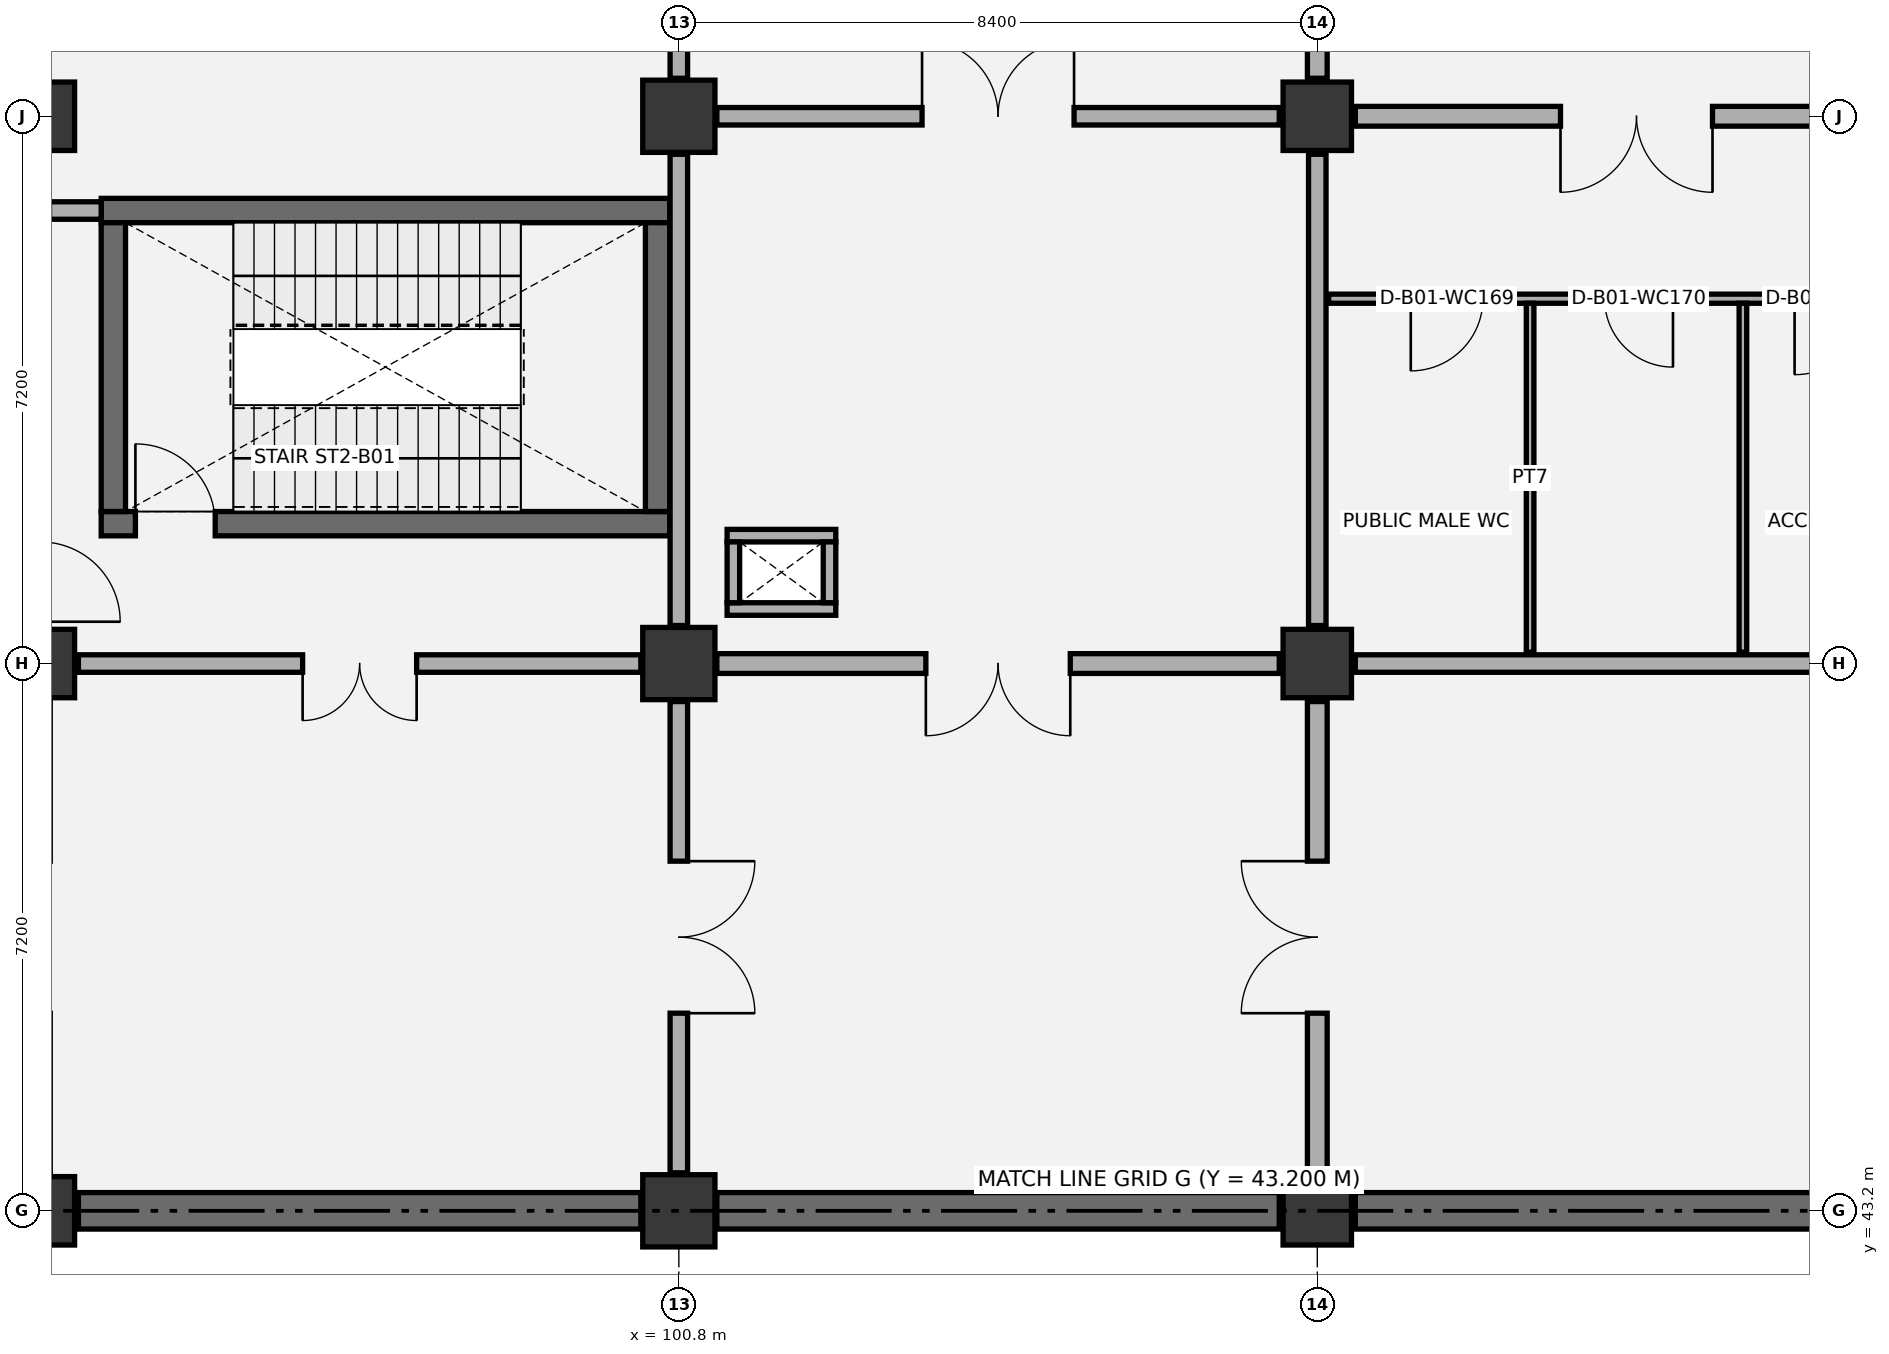
"""IFC4 building model, lengths in metres.
Left out: names, types, materials, properties, quantities, classifications, styles, units other than length and angle.
Written with IfcOpenShell. Run it as: python <this file> out.ifc"""

import sys

from ifc_helpers import new_model, si_unit, direction, frame, frame_2d, origin, origin_2d, place, context, subcontext, project, spatial, rectangle, extrude, element, fill, save


model = new_model("IFC4")
c1 = context("Model", 3, precision=1e-05, world=origin(), true_north=direction((0.0, 1.0)))
c2 = subcontext(c1, "Body", "Model", "MODEL_VIEW")
j1 = project(units=[si_unit("LENGTHUNIT", "METRE"), si_unit("PLANEANGLEUNIT", "RADIAN")], contexts=[c1])
p1 = place(None, origin())
s1 = spatial("IfcSite", under=j1, at=p1, CompositionType="ELEMENT")
p2 = place(p1, origin())
s2 = spatial("IfcBuilding", under=s1, at=p2, CompositionType="ELEMENT")
p3 = place(p2, frame((0.0, 0.0, -4.8)))
s3 = spatial("IfcBuildingStorey", under=s2, at=p3, CompositionType="ELEMENT", Elevation=-4.8)
for number, where, z_axis, x_axis in (
    (1, (92.4, 43.2, 0.0), (0.0, 0.0, 1.0), (1.0, 0.0, 0.0)),
    (2, (92.4, 50.4, 0.0), (0.0, 0.0, 1.0), (1.0, 0.0, 0.0)),
    (3, (92.4, 57.6, 0.0), (0.0, 0.0, 1.0), (1.0, 0.0, 0.0)),
):
    element("IfcColumn", number, at=place(p3, frame(where, z_axis=z_axis, x_axis=x_axis)), inside=s3, PredefinedType="COLUMN", context=c2, shape_type="SweptSolid", body=[
        extrude(rectangle(XDim=0.9, YDim=0.9, at=origin_2d()), origin(), (0.0, 0.0, 1.0), 4.8),
    ])
for number, where, z_axis, x_axis in (
    (4, (100.8, 43.2, 0.0), (0.0, 0.0, 1.0), (1.0, 0.0, 0.0)),
    (5, (100.8, 50.4, 0.0), (0.0, 0.0, 1.0), (1.0, 0.0, 0.0)),
    (6, (100.8, 57.6, 0.0), (0.0, 0.0, 1.0), (1.0, 0.0, 0.0)),
):
    element("IfcColumn", number, at=place(p3, frame(where, z_axis=z_axis, x_axis=x_axis)), inside=s3, PredefinedType="COLUMN", context=c2, shape_type="SweptSolid", body=[
        extrude(rectangle(XDim=0.95, YDim=0.95, at=origin_2d()), origin(), (0.0, 0.0, 1.0), 4.8),
    ])
for number, where, z_axis, x_axis in (
    (7, (109.2, 43.2, 0.0), (0.0, 0.0, 1.0), (1.0, 0.0, 0.0)),
    (8, (109.2, 50.4, 0.0), (0.0, 0.0, 1.0), (1.0, 0.0, 0.0)),
    (9, (109.2, 57.6, 0.0), (0.0, 0.0, 1.0), (1.0, 0.0, 0.0)),
):
    element("IfcColumn", number, at=place(p3, frame(where, z_axis=z_axis, x_axis=x_axis)), inside=s3, PredefinedType="COLUMN", context=c2, shape_type="SweptSolid", body=[
        extrude(rectangle(XDim=0.9, YDim=0.9, at=origin_2d()), origin(), (0.0, 0.0, 1.0), 4.8),
    ])
p4 = place(p3, frame((92.9, 43.2, 0.0), z_axis=(0.0, 0.0, 1.0), x_axis=(1.0, 0.0, 0.0)))
e10 = element("IfcWall", 10, at=p4, inside=s3, PredefinedType="USERDEFINED", context=c2, shape_type="SweptSolid", body=[
    extrude(rectangle(XDim=7.4, YDim=0.48, at=frame_2d((3.7, 0.0))), origin(), (0.0, 0.0, 1.0), 4.45),
])
p5 = place(p3, frame((101.3, 43.2, 0.0), z_axis=(0.0, 0.0, 1.0), x_axis=(1.0, 0.0, 0.0)))
e11 = element("IfcWall", 11, at=p5, inside=s3, PredefinedType="USERDEFINED", context=c2, shape_type="SweptSolid", body=[
    extrude(rectangle(XDim=7.4, YDim=0.48, at=frame_2d((3.7, 0.0))), origin(), (0.0, 0.0, 1.0), 4.45),
])
p6 = place(p3, frame((109.7, 43.2, 0.0), z_axis=(0.0, 0.0, 1.0), x_axis=(1.0, 0.0, 0.0)))
e12 = element("IfcWall", 12, at=p6, inside=s3, PredefinedType="USERDEFINED", context=c2, shape_type="SweptSolid", body=[
    extrude(rectangle(XDim=7.4, YDim=0.48, at=frame_2d((3.7, 0.0))), origin(), (0.0, 0.0, 1.0), 4.45),
])
p7 = place(p3, frame((93.2, 52.24, 0.0), z_axis=(0.0, 0.0, 1.0), x_axis=(1.0, 0.0, 0.0)))
e13 = element("IfcWall", 13, at=p7, inside=s3, PredefinedType="SHEAR", context=c2, shape_type="SweptSolid", body=[
    extrude(rectangle(XDim=7.48, YDim=0.32, at=frame_2d((3.74, 0.0))), origin(), (0.0, 0.0, 1.0), 4.45),
])
p8 = place(p7, frame((0.45, 0.0, 0.0)))
e14 = element("IfcOpeningElement", 14, at=p8, cuts=e13, PredefinedType="OPENING", context=c2, shape_type="SweptSolid", body=[
    extrude(rectangle(XDim=1.05, YDim=2.15, at=frame_2d((0.525, 1.075))), frame((0.0, 0.17, 0.0), z_axis=(0.0, -1.0, 0.0), x_axis=(1.0, 0.0, 0.0)), (0.0, 0.0, 1.0), 0.34),
])
p9 = place(p3, frame((93.2, 56.36, 0.0), z_axis=(0.0, 0.0, 1.0), x_axis=(1.0, 0.0, 0.0)))
e15 = element("IfcWall", 15, at=p9, inside=s3, PredefinedType="SHEAR", context=c2, shape_type="SweptSolid", body=[
    extrude(rectangle(XDim=7.48, YDim=0.32, at=frame_2d((3.74, 0.0))), origin(), (0.0, 0.0, 1.0), 4.45),
])
for number, where, z_axis, x_axis in (
    (16, (93.36, 52.4, 0.0), (0.0, 0.0, 1.0), (0.0, 1.0, 0.0)),
    (17, (100.52, 52.4, 0.0), (0.0, 0.0, 1.0), (0.0, 1.0, 0.0)),
):
    element("IfcWall", number, at=place(p3, frame(where, z_axis=z_axis, x_axis=x_axis)), inside=s3, PredefinedType="SHEAR", context=c2, shape_type="SweptSolid", body=[
        extrude(rectangle(XDim=3.8, YDim=0.32, at=frame_2d((1.9, 0.0))), origin(), (0.0, 0.0, 1.0), 4.45),
    ])
for number, where, z_axis, x_axis in (
    (18, (101.435, 51.117, 0.0), (0.0, 0.0, 1.0), (1.0, 0.0, 0.0)),
    (19, (101.435, 52.083, 0.0), (0.0, 0.0, 1.0), (1.0, 0.0, 0.0)),
):
    element("IfcWall", number, at=place(p3, frame(where, z_axis=z_axis, x_axis=x_axis)), inside=s3, PredefinedType="PARTITIONING", context=c2, shape_type="SweptSolid", body=[
        extrude(rectangle(XDim=1.43, YDim=0.165, at=frame_2d((0.715, 0.0))), origin(), (0.0, 0.0, 1.0), 4.45),
    ])
for number, where, z_axis, x_axis in (
    (20, (101.518, 51.2, 0.0), (0.0, 0.0, 1.0), (0.0, 1.0, 0.0)),
    (21, (102.782, 51.2, 0.0), (0.0, 0.0, 1.0), (0.0, 1.0, 0.0)),
):
    element("IfcWall", number, at=place(p3, frame(where, z_axis=z_axis, x_axis=x_axis)), inside=s3, PredefinedType="PARTITIONING", context=c2, shape_type="SweptSolid", body=[
        extrude(rectangle(XDim=0.8, YDim=0.165, at=frame_2d((0.4, 0.0))), origin(), (0.0, 0.0, 1.0), 4.45),
    ])
p10 = place(p3, frame((109.35, 55.2, 0.0), z_axis=(0.0, 0.0, 1.0), x_axis=(1.0, 0.0, 0.0)))
e22 = element("IfcWall", 22, at=p10, inside=s3, PredefinedType="PARTITIONING", context=c2, shape_type="SweptSolid", body=[
    extrude(rectangle(XDim=8.1, YDim=0.12, at=frame_2d((4.05, 0.0))), origin(), (0.0, 0.0, 1.0), 4.45),
])
p11 = place(p10, frame((1.08, 0.0, 0.0)))
e23 = element("IfcOpeningElement", 23, at=p11, cuts=e22, PredefinedType="OPENING", context=c2, shape_type="SweptSolid", body=[
    extrude(rectangle(XDim=0.95, YDim=2.1, at=frame_2d((0.475, 1.05))), frame((0.0, 0.07, 0.0), z_axis=(0.0, -1.0, 0.0), x_axis=(1.0, 0.0, 0.0)), (0.0, 0.0, 1.0), 0.14),
])
p12 = place(p10, frame((3.63, 0.0, 0.0)))
e24 = element("IfcOpeningElement", 24, at=p12, cuts=e22, PredefinedType="OPENING", context=c2, shape_type="SweptSolid", body=[
    extrude(rectangle(XDim=0.9, YDim=2.1, at=frame_2d((0.45, 1.05))), frame((0.0, 0.07, 0.0), z_axis=(0.0, -1.0, 0.0), x_axis=(1.0, 0.0, 0.0)), (0.0, 0.0, 1.0), 0.14),
])
p13 = place(p10, frame((6.13, 0.0, 0.0)))
e25 = element("IfcOpeningElement", 25, at=p13, cuts=e22, PredefinedType="OPENING", context=c2, shape_type="SweptSolid", body=[
    extrude(rectangle(XDim=1.0, YDim=2.1, at=frame_2d((0.5, 1.05))), frame((0.0, 0.07, 0.0), z_axis=(0.0, -1.0, 0.0), x_axis=(1.0, 0.0, 0.0)), (0.0, 0.0, 1.0), 0.14),
])
for number, where, z_axis, x_axis in (
    (26, (112.0, 50.55, 0.0), (0.0, 0.0, 1.0), (0.0, 1.0, 0.0)),
    (27, (114.8, 50.55, 0.0), (0.0, 0.0, 1.0), (0.0, 1.0, 0.0)),
):
    element("IfcWall", number, at=place(p3, frame(where, z_axis=z_axis, x_axis=x_axis)), inside=s3, PredefinedType="PARTITIONING", context=c2, shape_type="SweptSolid", body=[
        extrude(rectangle(XDim=4.59, YDim=0.1, at=frame_2d((2.295, 0.0))), origin(), (0.0, 0.0, 1.0), 4.45),
    ])
p14 = place(p3, frame((100.8, 43.7, 0.0), z_axis=(0.0, 0.0, 1.0), x_axis=(0.0, 1.0, 0.0)))
e28 = element("IfcWall", 28, at=p14, inside=s3, PredefinedType="PARTITIONING", context=c2, shape_type="SweptSolid", body=[
    extrude(rectangle(XDim=6.2, YDim=0.23, at=frame_2d((3.1, 0.0))), origin(), (0.0, 0.0, 1.0), 3.645),
])
p15 = place(p14, frame((2.1, 0.0, 0.0)))
e29 = element("IfcOpeningElement", 29, at=p15, cuts=e28, PredefinedType="OPENING", context=c2, shape_type="SweptSolid", body=[
    extrude(rectangle(XDim=2.0, YDim=2.35, at=frame_2d((1.0, 1.175))), frame((0.0, 0.125, 0.0), z_axis=(0.0, -1.0, 0.0), x_axis=(1.0, 0.0, 0.0)), (0.0, 0.0, 1.0), 0.25),
])
p16 = place(p3, frame((92.9, 50.4, 0.0), z_axis=(0.0, 0.0, 1.0), x_axis=(1.0, 0.0, 0.0)))
e30 = element("IfcWall", 30, at=p16, inside=s3, PredefinedType="PARTITIONING", context=c2, shape_type="SweptSolid", body=[
    extrude(rectangle(XDim=7.4, YDim=0.23, at=frame_2d((3.7, 0.0))), origin(), (0.0, 0.0, 1.0), 3.545),
])
p17 = place(p16, frame((2.95, 0.0, 0.0)))
e31 = element("IfcOpeningElement", 31, at=p17, cuts=e30, PredefinedType="OPENING", context=c2, shape_type="SweptSolid", body=[
    extrude(rectangle(XDim=1.5, YDim=2.15, at=frame_2d((0.75, 1.075))), frame((0.0, 0.125, 0.0), z_axis=(0.0, -1.0, 0.0), x_axis=(1.0, 0.0, 0.0)), (0.0, 0.0, 1.0), 0.25),
])
p18 = place(p3, frame((100.8, 50.9, 0.0), z_axis=(0.0, 0.0, 1.0), x_axis=(0.0, 1.0, 0.0)))
e32 = element("IfcWall", 32, at=p18, inside=s3, PredefinedType="PARTITIONING", context=c2, shape_type="SweptSolid", body=[
    extrude(rectangle(XDim=6.2, YDim=0.23, at=frame_2d((3.1, 0.0))), origin(), (0.0, 0.0, 1.0), 3.645),
])
p19 = place(p3, frame((92.52, 56.36, 0.0), z_axis=(0.0, 0.0, 1.0), x_axis=(1.0, 0.0, 0.0)))
e33 = element("IfcWall", 33, at=p19, inside=s3, PredefinedType="PARTITIONING", context=c2, shape_type="SweptSolid", body=[
    extrude(rectangle(XDim=0.68, YDim=0.23, at=frame_2d((0.34, 0.0))), origin(), (0.0, 0.0, 1.0), 4.45),
])
p20 = place(p3, frame((100.8, 58.1, 0.0), z_axis=(0.0, 0.0, 1.0), x_axis=(0.0, 1.0, 0.0)))
e34 = element("IfcWall", 34, at=p20, inside=s3, PredefinedType="PARTITIONING", context=c2, shape_type="SweptSolid", body=[
    extrude(rectangle(XDim=6.2, YDim=0.23, at=frame_2d((3.1, 0.0))), origin(), (0.0, 0.0, 1.0), 3.645),
])
p21 = place(p3, frame((109.2, 43.7, 0.0), z_axis=(0.0, 0.0, 1.0), x_axis=(0.0, 1.0, 0.0)))
e35 = element("IfcWall", 35, at=p21, inside=s3, PredefinedType="PARTITIONING", context=c2, shape_type="SweptSolid", body=[
    extrude(rectangle(XDim=6.2, YDim=0.26, at=frame_2d((3.1, 0.0))), origin(), (0.0, 0.0, 1.0), 3.645),
])
p22 = place(p21, frame((2.1, 0.0, 0.0)))
e36 = element("IfcOpeningElement", 36, at=p22, cuts=e35, PredefinedType="OPENING", context=c2, shape_type="SweptSolid", body=[
    extrude(rectangle(XDim=2.0, YDim=2.35, at=frame_2d((1.0, 1.175))), frame((0.0, 0.14, 0.0), z_axis=(0.0, -1.0, 0.0), x_axis=(1.0, 0.0, 0.0)), (0.0, 0.0, 1.0), 0.28),
])
p23 = place(p3, frame((101.3, 50.4, 0.0), z_axis=(0.0, 0.0, 1.0), x_axis=(1.0, 0.0, 0.0)))
e37 = element("IfcWall", 37, at=p23, inside=s3, PredefinedType="PARTITIONING", context=c2, shape_type="SweptSolid", body=[
    extrude(rectangle(XDim=7.4, YDim=0.26, at=frame_2d((3.7, 0.0))), origin(), (0.0, 0.0, 1.0), 3.545),
])
p24 = place(p23, frame((2.75, 0.0, 0.0)))
e38 = element("IfcOpeningElement", 38, at=p24, cuts=e37, PredefinedType="OPENING", context=c2, shape_type="SweptSolid", body=[
    extrude(rectangle(XDim=1.9, YDim=2.3, at=frame_2d((0.95, 1.15))), frame((0.0, 0.14, 0.0), z_axis=(0.0, -1.0, 0.0), x_axis=(1.0, 0.0, 0.0)), (0.0, 0.0, 1.0), 0.28),
])
p25 = place(p3, frame((109.2, 50.9, 0.0), z_axis=(0.0, 0.0, 1.0), x_axis=(0.0, 1.0, 0.0)))
e39 = element("IfcWall", 39, at=p25, inside=s3, PredefinedType="PARTITIONING", context=c2, shape_type="SweptSolid", body=[
    extrude(rectangle(XDim=6.2, YDim=0.23, at=frame_2d((3.1, 0.0))), origin(), (0.0, 0.0, 1.0), 3.645),
])
p26 = place(p3, frame((101.3, 57.6, 0.0), z_axis=(0.0, 0.0, 1.0), x_axis=(1.0, 0.0, 0.0)))
e40 = element("IfcWall", 40, at=p26, inside=s3, PredefinedType="PARTITIONING", context=c2, shape_type="SweptSolid", body=[
    extrude(rectangle(XDim=7.4, YDim=0.23, at=frame_2d((3.7, 0.0))), origin(), (0.0, 0.0, 1.0), 3.545),
])
p27 = place(p26, frame((2.7, 0.0, 0.0)))
e41 = element("IfcOpeningElement", 41, at=p27, cuts=e40, PredefinedType="OPENING", context=c2, shape_type="SweptSolid", body=[
    extrude(rectangle(XDim=2.0, YDim=2.35, at=frame_2d((1.0, 1.175))), frame((0.0, 0.125, 0.0), z_axis=(0.0, -1.0, 0.0), x_axis=(1.0, 0.0, 0.0)), (0.0, 0.0, 1.0), 0.25),
])
p28 = place(p3, frame((109.2, 58.1, 0.0), z_axis=(0.0, 0.0, 1.0), x_axis=(0.0, 1.0, 0.0)))
e42 = element("IfcWall", 42, at=p28, inside=s3, PredefinedType="PARTITIONING", context=c2, shape_type="SweptSolid", body=[
    extrude(rectangle(XDim=6.2, YDim=0.26, at=frame_2d((3.1, 0.0))), origin(), (0.0, 0.0, 1.0), 3.645),
])
p29 = place(p28, frame((2.15, 0.0, 0.0)))
e43 = element("IfcOpeningElement", 43, at=p29, cuts=e42, PredefinedType="OPENING", context=c2, shape_type="SweptSolid", body=[
    extrude(rectangle(XDim=1.9, YDim=2.3, at=frame_2d((0.95, 1.15))), frame((0.0, 0.14, 0.0), z_axis=(0.0, -1.0, 0.0), x_axis=(1.0, 0.0, 0.0)), (0.0, 0.0, 1.0), 0.28),
])
p30 = place(p3, frame((109.7, 50.4, 0.0), z_axis=(0.0, 0.0, 1.0), x_axis=(1.0, 0.0, 0.0)))
e44 = element("IfcWall", 44, at=p30, inside=s3, PredefinedType="PARTITIONING", context=c2, shape_type="SweptSolid", body=[
    extrude(rectangle(XDim=7.4, YDim=0.23, at=frame_2d((3.7, 0.0))), origin(), (0.0, 0.0, 1.0), 3.545),
])
p31 = place(p3, frame((109.7, 57.6, 0.0), z_axis=(0.0, 0.0, 1.0), x_axis=(1.0, 0.0, 0.0)))
e45 = element("IfcWall", 45, at=p31, inside=s3, PredefinedType="PARTITIONING", context=c2, shape_type="SweptSolid", body=[
    extrude(rectangle(XDim=7.4, YDim=0.26, at=frame_2d((3.7, 0.0))), origin(), (0.0, 0.0, 1.0), 3.545),
])
p32 = place(p31, frame((2.7, 0.0, 0.0)))
e46 = element("IfcOpeningElement", 46, at=p32, cuts=e45, PredefinedType="OPENING", context=c2, shape_type="SweptSolid", body=[
    extrude(rectangle(XDim=2.0, YDim=2.35, at=frame_2d((1.0, 1.175))), frame((0.0, 0.14, 0.0), z_axis=(0.0, -1.0, 0.0), x_axis=(1.0, 0.0, 0.0)), (0.0, 0.0, 1.0), 0.28),
])
p33 = place(p8, origin())
e47 = element("IfcDoor", 47, at=p33, inside=s3, OperationType="SINGLE_SWING_LEFT", PredefinedType="DOOR", context=c2, shape_type="SweptSolid", body=[
    extrude(rectangle(XDim=1.05, YDim=2.15, at=frame_2d((0.525, 1.075))), frame((0.0, 0.025, 0.0), z_axis=(0.0, -1.0, 0.0), x_axis=(1.0, 0.0, 0.0)), (0.0, 0.0, 1.0), 0.05),
])
fill(e14, e47)
p34 = place(p11, frame((0.95, 0.0, 0.0), z_axis=(0.0, 0.0, 1.0), x_axis=(-1.0, 0.0, 0.0)))
e48 = element("IfcDoor", 48, at=p34, inside=s3, OperationType="SINGLE_SWING_RIGHT", PredefinedType="DOOR", context=c2, shape_type="SweptSolid", body=[
    extrude(rectangle(XDim=0.95, YDim=2.1, at=frame_2d((0.475, 1.05))), frame((0.0, 0.025, 0.0), z_axis=(0.0, -1.0, 0.0), x_axis=(1.0, 0.0, 0.0)), (0.0, 0.0, 1.0), 0.05),
])
fill(e23, e48)
p35 = place(p12, frame((0.9, 0.0, 0.0), z_axis=(0.0, 0.0, 1.0), x_axis=(-1.0, 0.0, 0.0)))
e49 = element("IfcDoor", 49, at=p35, inside=s3, OperationType="SINGLE_SWING_LEFT", PredefinedType="DOOR", context=c2, shape_type="SweptSolid", body=[
    extrude(rectangle(XDim=0.9, YDim=2.1, at=frame_2d((0.45, 1.05))), frame((0.0, 0.025, 0.0), z_axis=(0.0, -1.0, 0.0), x_axis=(1.0, 0.0, 0.0)), (0.0, 0.0, 1.0), 0.05),
])
fill(e24, e49)
p36 = place(p13, frame((1.0, 0.0, 0.0), z_axis=(0.0, 0.0, 1.0), x_axis=(-1.0, 0.0, 0.0)))
e50 = element("IfcDoor", 50, at=p36, inside=s3, OperationType="SINGLE_SWING_RIGHT", PredefinedType="DOOR", context=c2, shape_type="SweptSolid", body=[
    extrude(rectangle(XDim=1.0, YDim=2.1, at=frame_2d((0.5, 1.05))), frame((0.0, 0.025, 0.0), z_axis=(0.0, -1.0, 0.0), x_axis=(1.0, 0.0, 0.0)), (0.0, 0.0, 1.0), 0.05),
])
fill(e25, e50)
p37 = place(p15, frame((2.0, 0.0, 0.0), z_axis=(0.0, 0.0, 1.0), x_axis=(-1.0, 0.0, 0.0)))
e51 = element("IfcDoor", 51, at=p37, inside=s3, OperationType="DOUBLE_DOOR_SINGLE_SWING", PredefinedType="DOOR", context=c2, shape_type="SweptSolid", body=[
    extrude(rectangle(XDim=2.0, YDim=2.35, at=frame_2d((1.0, 1.175))), frame((0.0, 0.025, 0.0), z_axis=(0.0, -1.0, 0.0), x_axis=(1.0, 0.0, 0.0)), (0.0, 0.0, 1.0), 0.05),
])
fill(e29, e51)
p38 = place(p17, frame((1.5, 0.0, 0.0), z_axis=(0.0, 0.0, 1.0), x_axis=(-1.0, 0.0, 0.0)))
e52 = element("IfcDoor", 52, at=p38, inside=s3, OperationType="DOUBLE_DOOR_SINGLE_SWING", PredefinedType="DOOR", context=c2, shape_type="SweptSolid", body=[
    extrude(rectangle(XDim=1.5, YDim=2.15, at=frame_2d((0.75, 1.075))), frame((0.0, 0.025, 0.0), z_axis=(0.0, -1.0, 0.0), x_axis=(1.0, 0.0, 0.0)), (0.0, 0.0, 1.0), 0.05),
])
fill(e31, e52)
p39 = place(p22, origin())
e53 = element("IfcDoor", 53, at=p39, inside=s3, OperationType="DOUBLE_DOOR_SINGLE_SWING", PredefinedType="DOOR", context=c2, shape_type="SweptSolid", body=[
    extrude(rectangle(XDim=2.0, YDim=2.35, at=frame_2d((1.0, 1.175))), frame((0.0, 0.025, 0.0), z_axis=(0.0, -1.0, 0.0), x_axis=(1.0, 0.0, 0.0)), (0.0, 0.0, 1.0), 0.05),
])
fill(e36, e53)
p40 = place(p24, frame((1.9, 0.0, 0.0), z_axis=(0.0, 0.0, 1.0), x_axis=(-1.0, 0.0, 0.0)))
e54 = element("IfcDoor", 54, at=p40, inside=s3, OperationType="DOUBLE_DOOR_SINGLE_SWING", PredefinedType="DOOR", context=c2, shape_type="SweptSolid", body=[
    extrude(rectangle(XDim=1.9, YDim=2.3, at=frame_2d((0.95, 1.15))), frame((0.0, 0.025, 0.0), z_axis=(0.0, -1.0, 0.0), x_axis=(1.0, 0.0, 0.0)), (0.0, 0.0, 1.0), 0.05),
])
fill(e38, e54)
p41 = place(p27, origin())
e55 = element("IfcDoor", 55, at=p41, inside=s3, OperationType="DOUBLE_DOOR_SINGLE_SWING", PredefinedType="DOOR", context=c2, shape_type="SweptSolid", body=[
    extrude(rectangle(XDim=2.0, YDim=2.35, at=frame_2d((1.0, 1.175))), frame((0.0, 0.025, 0.0), z_axis=(0.0, -1.0, 0.0), x_axis=(1.0, 0.0, 0.0)), (0.0, 0.0, 1.0), 0.05),
])
fill(e41, e55)
p42 = place(p32, frame((2.0, 0.0, 0.0), z_axis=(0.0, 0.0, 1.0), x_axis=(-1.0, 0.0, 0.0)))
e56 = element("IfcDoor", 56, at=p42, inside=s3, OperationType="DOUBLE_DOOR_SINGLE_SWING", PredefinedType="DOOR", context=c2, shape_type="SweptSolid", body=[
    extrude(rectangle(XDim=2.0, YDim=2.35, at=frame_2d((1.0, 1.175))), frame((0.0, 0.025, 0.0), z_axis=(0.0, -1.0, 0.0), x_axis=(1.0, 0.0, 0.0)), (0.0, 0.0, 1.0), 0.05),
])
fill(e46, e56)
save(model, sys.argv[1])
